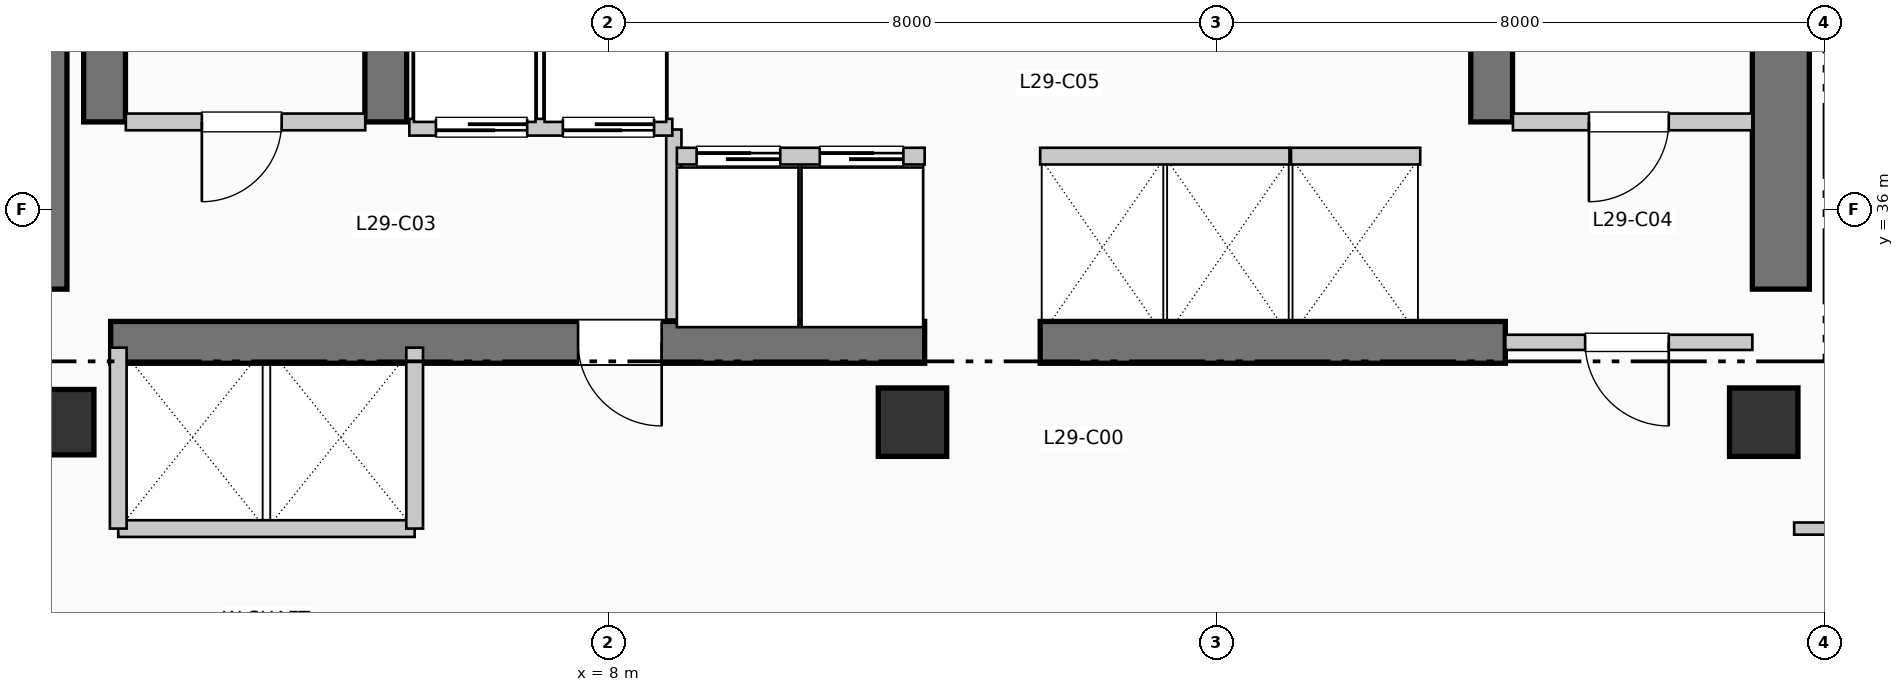
"""IFC4 building model, lengths in metres.
Left out: names, types, materials, properties, quantities, classifications, styles, units other than length and angle.
Written with IfcOpenShell. Run it as: python <this file> out.ifc"""

import sys

from ifc_helpers import new_model, si_unit, direction, frame, frame_2d, origin, origin_2d, place, context, subcontext, project, spatial, rectangle, extrude, element, fill, save


model = new_model("IFC4")
c1 = context("Model", 3, precision=1e-05, world=origin(), true_north=direction((0.0, 1.0)))
c2 = subcontext(c1, "Body", "Model", "MODEL_VIEW")
j1 = project(units=[si_unit("LENGTHUNIT", "METRE"), si_unit("PLANEANGLEUNIT", "RADIAN")], contexts=[c1])
p1 = place(None, origin())
s1 = spatial("IfcSite", under=j1, at=p1, CompositionType="ELEMENT")
p2 = place(p1, origin())
s2 = spatial("IfcBuilding", under=s1, at=p2, CompositionType="ELEMENT")
p3 = place(p2, frame((0.0, 0.0, 122.43)))
s3 = spatial("IfcBuildingStorey", under=s2, at=p3, CompositionType="ELEMENT", Elevation=122.43)
p4 = place(p3, frame((0.5, 34.95, 0.0), z_axis=(0.0, 0.0, 1.0), x_axis=(0.0, 1.0, 0.0)))
e1 = element("IfcWall", 1, at=p4, inside=s3, PredefinedType="SHEAR", context=c2, shape_type="SweptSolid", body=[
    extrude(rectangle(XDim=7.9, YDim=0.75, at=frame_2d((3.95, 0.0))), origin(), (0.0, 0.0, 1.0), 3.96),
])
p5 = place(p3, frame((23.425, 34.95, 0.0), z_axis=(0.0, 0.0, 1.0), x_axis=(0.0, 1.0, 0.0)))
e2 = element("IfcWall", 2, at=p5, inside=s3, PredefinedType="SHEAR", context=c2, shape_type="SweptSolid", body=[
    extrude(rectangle(XDim=10.64, YDim=0.75, at=frame_2d((5.32, 0.0))), origin(), (0.0, 0.0, 1.0), 3.96),
])
p6 = place(p3, frame((1.45, 34.25, 0.0), z_axis=(0.0, 0.0, 1.0), x_axis=(1.0, 0.0, 0.0)))
e3 = element("IfcWall", 3, at=p6, inside=s3, PredefinedType="SHEAR", context=c2, shape_type="SweptSolid", body=[
    extrude(rectangle(XDim=10.71, YDim=0.55, at=frame_2d((5.355, 0.0))), origin(), (0.0, 0.0, 1.0), 3.96),
])
p7 = place(p6, frame((7.25, 0.0, 0.0), z_axis=(0.0, 0.0, 1.0), x_axis=(-1.0, 0.0, 0.0)))
e4 = element("IfcOpeningElement", 4, at=p7, cuts=e3, PredefinedType="OPENING", context=c2, shape_type="SweptSolid", body=[
    extrude(rectangle(XDim=1.1, YDim=2.15, at=frame_2d((0.55, 1.075))), frame((0.0, 0.285, 0.0), z_axis=(0.0, -1.0, 0.0), x_axis=(1.0, 0.0, 0.0)), (0.0, 0.0, 1.0), 0.57),
])
p8 = place(p3, frame((13.68, 34.25, 0.0), z_axis=(0.0, 0.0, 1.0), x_axis=(1.0, 0.0, 0.0)))
e5 = element("IfcWall", 5, at=p8, inside=s3, PredefinedType="SHEAR", context=c2, shape_type="SweptSolid", body=[
    extrude(rectangle(XDim=6.12, YDim=0.55, at=frame_2d((3.06, 0.0))), origin(), (0.0, 0.0, 1.0), 3.96),
])
for number, where, z_axis, x_axis in (
    (6, (1.37, 37.15, 0.0), (0.0, 0.0, 1.0), (0.0, 1.0, 0.0)),
    (7, (5.07, 37.15, 0.0), (0.0, 0.0, 1.0), (0.0, 1.0, 0.0)),
    (8, (19.62, 37.15, 0.0), (0.0, 0.0, 1.0), (0.0, 1.0, 0.0)),
):
    element("IfcWall", number, at=place(p3, frame(where, z_axis=z_axis, x_axis=x_axis)), inside=s3, PredefinedType="SHEAR", context=c2, shape_type="SweptSolid", body=[
        extrude(rectangle(XDim=7.89, YDim=0.55, at=frame_2d((3.945, 0.0))), origin(), (0.0, 0.0, 1.0), 3.96),
    ])
p9 = place(p3, frame((0.8, 33.2, 0.0), z_axis=(0.0, 0.0, 1.0), x_axis=(1.0, 0.0, 0.0)))
e9 = element("IfcColumn", 9, at=p9, inside=s3, PredefinedType="COLUMN", context=c2, shape_type="SweptSolid", body=[
    extrude(rectangle(XDim=0.86, YDim=0.86, at=origin_2d()), origin(), (0.0, 0.0, 1.0), 3.96),
])
for number, where, z_axis, x_axis in (
    (10, (12.0, 33.2, 0.0), (0.0, 0.0, 1.0), (1.0, 0.0, 0.0)),
    (11, (23.2, 33.2, 0.0), (0.0, 0.0, 1.0), (1.0, 0.0, 0.0)),
):
    element("IfcColumn", number, at=place(p3, frame(where, z_axis=z_axis, x_axis=x_axis)), inside=s3, PredefinedType="COLUMN", context=c2, shape_type="SweptSolid", body=[
        extrude(rectangle(XDim=0.9, YDim=0.9, at=origin_2d()), origin(), (0.0, 0.0, 1.0), 3.96),
    ])
p10 = place(p3, frame((1.65, 37.15, 0.0), z_axis=(0.0, 0.0, 1.0), x_axis=(1.0, 0.0, 0.0)))
e12 = element("IfcWall", 12, at=p10, inside=s3, PredefinedType="PARTITIONING", context=c2, shape_type="SweptSolid", body=[
    extrude(rectangle(XDim=3.15, YDim=0.22, at=frame_2d((1.575, 0.0))), origin(), (0.0, 0.0, 1.0), 3.71),
])
p11 = place(p10, frame((2.05, 0.0, 0.0), z_axis=(0.0, 0.0, 1.0), x_axis=(-1.0, 0.0, 0.0)))
e13 = element("IfcOpeningElement", 13, at=p11, cuts=e12, PredefinedType="OPENING", context=c2, shape_type="SweptSolid", body=[
    extrude(rectangle(XDim=1.05, YDim=2.15, at=frame_2d((0.525, 1.075))), frame((0.0, 0.12, 0.0), z_axis=(0.0, -1.0, 0.0), x_axis=(1.0, 0.0, 0.0)), (0.0, 0.0, 1.0), 0.24),
])
p12 = place(p3, frame((8.86, 34.55, 0.0), z_axis=(0.0, 0.0, 1.0), x_axis=(0.0, 1.0, 0.0)))
e14 = element("IfcWall", 14, at=p12, inside=s3, PredefinedType="PARTITIONING", context=c2, shape_type="SweptSolid", body=[
    extrude(rectangle(XDim=2.5, YDim=0.2, at=frame_2d((1.25, 0.0))), origin(), (0.0, 0.0, 1.0), 3.71),
])
p13 = place(p3, frame((19.9, 37.15, 0.0), z_axis=(0.0, 0.0, 1.0), x_axis=(1.0, 0.0, 0.0)))
e15 = element("IfcWall", 15, at=p13, inside=s3, PredefinedType="PARTITIONING", context=c2, shape_type="SweptSolid", body=[
    extrude(rectangle(XDim=3.15, YDim=0.22, at=frame_2d((1.575, 0.0))), origin(), (0.0, 0.0, 1.0), 3.71),
])
p14 = place(p13, frame((2.05, 0.0, 0.0), z_axis=(0.0, 0.0, 1.0), x_axis=(-1.0, 0.0, 0.0)))
e16 = element("IfcOpeningElement", 16, at=p14, cuts=e15, PredefinedType="OPENING", context=c2, shape_type="SweptSolid", body=[
    extrude(rectangle(XDim=1.05, YDim=2.15, at=frame_2d((0.525, 1.075))), frame((0.0, 0.12, 0.0), z_axis=(0.0, -1.0, 0.0), x_axis=(1.0, 0.0, 0.0)), (0.0, 0.0, 1.0), 0.24),
])
p15 = place(p3, frame((19.8, 34.25, 0.0), z_axis=(0.0, 0.0, 1.0), x_axis=(1.0, 0.0, 0.0)))
e17 = element("IfcWall", 17, at=p15, inside=s3, PredefinedType="PARTITIONING", context=c2, shape_type="SweptSolid", body=[
    extrude(rectangle(XDim=3.25, YDim=0.2, at=frame_2d((1.625, 0.0))), origin(), (0.0, 0.0, 1.0), 3.71),
])
p16 = place(p15, frame((2.15, 0.0, 0.0), z_axis=(0.0, 0.0, 1.0), x_axis=(-1.0, 0.0, 0.0)))
e18 = element("IfcOpeningElement", 18, at=p16, cuts=e17, PredefinedType="OPENING", context=c2, shape_type="SweptSolid", body=[
    extrude(rectangle(XDim=1.1, YDim=2.15, at=frame_2d((0.55, 1.075))), frame((0.0, 0.11, 0.0), z_axis=(0.0, -1.0, 0.0), x_axis=(1.0, 0.0, 0.0)), (0.0, 0.0, 1.0), 0.22),
])
p17 = place(p3, frame((5.38, 37.08, 0.0), z_axis=(0.0, 0.0, 1.0), x_axis=(1.0, 0.0, 0.0)))
e19 = element("IfcWall", 19, at=p17, inside=s3, PredefinedType="PARTITIONING", context=c2, shape_type="SweptSolid", body=[
    extrude(rectangle(XDim=3.46, YDim=0.22, at=frame_2d((1.73, 0.0))), origin(), (0.0, 0.0, 1.0), 3.71),
])
p18 = place(p17, frame((1.55, 0.0, 0.0), z_axis=(0.0, 0.0, 1.0), x_axis=(-1.0, 0.0, 0.0)))
e20 = element("IfcOpeningElement", 20, at=p18, cuts=e19, PredefinedType="OPENING", context=c2, shape_type="SweptSolid", body=[
    extrude(rectangle(XDim=1.2, YDim=2.2, at=frame_2d((0.6, 1.1))), frame((0.0, 0.12, 0.0), z_axis=(0.0, -1.0, 0.0), x_axis=(1.0, 0.0, 0.0)), (0.0, 0.0, 1.0), 0.24),
])
p19 = place(p17, frame((3.22, 0.0, 0.0), z_axis=(0.0, 0.0, 1.0), x_axis=(-1.0, 0.0, 0.0)))
e21 = element("IfcOpeningElement", 21, at=p19, cuts=e19, PredefinedType="OPENING", context=c2, shape_type="SweptSolid", body=[
    extrude(rectangle(XDim=1.2, YDim=2.2, at=frame_2d((0.6, 1.1))), frame((0.0, 0.12, 0.0), z_axis=(0.0, -1.0, 0.0), x_axis=(1.0, 0.0, 0.0)), (0.0, 0.0, 1.0), 0.24),
])
p20 = place(p3, frame((1.55, 31.8, 0.0), z_axis=(0.0, 0.0, 1.0), x_axis=(1.0, 0.0, 0.0)))
e22 = element("IfcWall", 22, at=p20, inside=s3, PredefinedType="PARTITIONING", context=c2, shape_type="SweptSolid", body=[
    extrude(rectangle(XDim=3.9, YDim=0.22, at=frame_2d((1.95, 0.0))), origin(), (0.0, 0.0, 1.0), 3.71),
])
for number, where, z_axis, x_axis in (
    (23, (1.55, 31.8, 0.0), (0.0, 0.0, 1.0), (0.0, 1.0, 0.0)),
    (24, (5.45, 31.8, 0.0), (0.0, 0.0, 1.0), (0.0, 1.0, 0.0)),
):
    element("IfcWall", number, at=place(p3, frame(where, z_axis=z_axis, x_axis=x_axis)), inside=s3, PredefinedType="PARTITIONING", context=c2, shape_type="SweptSolid", body=[
        extrude(rectangle(XDim=2.38, YDim=0.22, at=frame_2d((1.19, 0.0))), origin(), (0.0, 0.0, 1.0), 3.71),
    ])
p21 = place(p3, frame((8.9, 36.7, 0.0), z_axis=(0.0, 0.0, 1.0), x_axis=(1.0, 0.0, 0.0)))
e25 = element("IfcWall", 25, at=p21, inside=s3, PredefinedType="PARTITIONING", context=c2, shape_type="SweptSolid", body=[
    extrude(rectangle(XDim=3.26, YDim=0.22, at=frame_2d((1.63, 0.0))), origin(), (0.0, 0.0, 1.0), 3.71),
])
p22 = place(p21, frame((0.26, 0.0, 0.0)))
e26 = element("IfcOpeningElement", 26, at=p22, cuts=e25, PredefinedType="OPENING", context=c2, shape_type="SweptSolid", body=[
    extrude(rectangle(XDim=1.1, YDim=2.2, at=frame_2d((0.55, 1.1))), frame((0.0, 0.12, 0.0), z_axis=(0.0, -1.0, 0.0), x_axis=(1.0, 0.0, 0.0)), (0.0, 0.0, 1.0), 0.24),
])
p23 = place(p21, frame((1.88, 0.0, 0.0)))
e27 = element("IfcOpeningElement", 27, at=p23, cuts=e25, PredefinedType="OPENING", context=c2, shape_type="SweptSolid", body=[
    extrude(rectangle(XDim=1.1, YDim=2.2, at=frame_2d((0.55, 1.1))), frame((0.0, 0.12, 0.0), z_axis=(0.0, -1.0, 0.0), x_axis=(1.0, 0.0, 0.0)), (0.0, 0.0, 1.0), 0.24),
])
p24 = place(p3, frame((13.68, 36.7, 0.0), z_axis=(0.0, 0.0, 1.0), x_axis=(1.0, 0.0, 0.0)))
e28 = element("IfcWall", 28, at=p24, inside=s3, PredefinedType="PARTITIONING", context=c2, shape_type="SweptSolid", body=[
    extrude(rectangle(XDim=3.28, YDim=0.22, at=frame_2d((1.64, 0.0))), origin(), (0.0, 0.0, 1.0), 3.71),
])
p25 = place(p3, frame((16.98, 36.7, 0.0), z_axis=(0.0, 0.0, 1.0), x_axis=(1.0, 0.0, 0.0)))
e29 = element("IfcWall", 29, at=p25, inside=s3, PredefinedType="PARTITIONING", context=c2, shape_type="SweptSolid", body=[
    extrude(rectangle(XDim=1.7, YDim=0.22, at=frame_2d((0.85, 0.0))), origin(), (0.0, 0.0, 1.0), 3.71),
])
p26 = place(p3, frame((23.6, 31.8, 0.0), z_axis=(0.0, 0.0, 1.0), x_axis=(1.0, 0.0, 0.0)))
e30 = element("IfcWall", 30, at=p26, inside=s3, PredefinedType="PARTITIONING", context=c2, shape_type="SweptSolid", body=[
    extrude(rectangle(XDim=26.41, YDim=0.16, at=frame_2d((13.205, 0.0))), origin(), (0.0, 0.0, 1.0), 3.71),
])
p27 = place(p26, frame((4.147, 0.0, 0.0)))
e31 = element("IfcOpeningElement", 31, at=p27, cuts=e30, PredefinedType="OPENING", context=c2, shape_type="SweptSolid", body=[
    extrude(rectangle(XDim=0.95, YDim=2.15, at=frame_2d((0.475, 1.075))), frame((0.0, 0.09, 0.0), z_axis=(0.0, -1.0, 0.0), x_axis=(1.0, 0.0, 0.0)), (0.0, 0.0, 1.0), 0.18),
])
p28 = place(p26, frame((13.39, 0.0, 0.0)))
e32 = element("IfcOpeningElement", 32, at=p28, cuts=e30, PredefinedType="OPENING", context=c2, shape_type="SweptSolid", body=[
    extrude(rectangle(XDim=0.95, YDim=2.15, at=frame_2d((0.475, 1.075))), frame((0.0, 0.09, 0.0), z_axis=(0.0, -1.0, 0.0), x_axis=(1.0, 0.0, 0.0)), (0.0, 0.0, 1.0), 0.18),
])
p29 = place(p26, frame((21.973, 0.0, 0.0)))
e33 = element("IfcOpeningElement", 33, at=p29, cuts=e30, PredefinedType="OPENING", context=c2, shape_type="SweptSolid", body=[
    extrude(rectangle(XDim=0.95, YDim=2.15, at=frame_2d((0.475, 1.075))), frame((0.0, 0.09, 0.0), z_axis=(0.0, -1.0, 0.0), x_axis=(1.0, 0.0, 0.0)), (0.0, 0.0, 1.0), 0.18),
])
p30 = place(p11, origin())
e34 = element("IfcDoor", 34, at=p30, inside=s3, OperationType="SINGLE_SWING_LEFT", PredefinedType="DOOR", context=c2, shape_type="SweptSolid", body=[
    extrude(rectangle(XDim=1.05, YDim=2.15, at=frame_2d((0.525, 1.075))), frame((0.0, 0.025, 0.0), z_axis=(0.0, -1.0, 0.0), x_axis=(1.0, 0.0, 0.0)), (0.0, 0.0, 1.0), 0.05),
])
fill(e13, e34)
p31 = place(p7, origin())
e35 = element("IfcDoor", 35, at=p31, inside=s3, OperationType="SINGLE_SWING_RIGHT", PredefinedType="DOOR", context=c2, shape_type="SweptSolid", body=[
    extrude(rectangle(XDim=1.1, YDim=2.15, at=frame_2d((0.55, 1.075))), frame((0.0, 0.025, 0.0), z_axis=(0.0, -1.0, 0.0), x_axis=(1.0, 0.0, 0.0)), (0.0, 0.0, 1.0), 0.05),
])
fill(e4, e35)
p32 = place(p14, origin())
e36 = element("IfcDoor", 36, at=p32, inside=s3, OperationType="SINGLE_SWING_LEFT", PredefinedType="DOOR", context=c2, shape_type="SweptSolid", body=[
    extrude(rectangle(XDim=1.05, YDim=2.15, at=frame_2d((0.525, 1.075))), frame((0.0, 0.025, 0.0), z_axis=(0.0, -1.0, 0.0), x_axis=(1.0, 0.0, 0.0)), (0.0, 0.0, 1.0), 0.05),
])
fill(e16, e36)
p33 = place(p16, origin())
e37 = element("IfcDoor", 37, at=p33, inside=s3, OperationType="SINGLE_SWING_RIGHT", PredefinedType="DOOR", context=c2, shape_type="SweptSolid", body=[
    extrude(rectangle(XDim=1.1, YDim=2.15, at=frame_2d((0.55, 1.075))), frame((0.0, 0.025, 0.0), z_axis=(0.0, -1.0, 0.0), x_axis=(1.0, 0.0, 0.0)), (0.0, 0.0, 1.0), 0.05),
])
fill(e18, e37)
p34 = place(p18, origin())
e38 = element("IfcDoor", 38, at=p34, inside=s3, OperationType="SLIDING_TO_RIGHT", PredefinedType="DOOR", context=c2, shape_type="SweptSolid", body=[
    extrude(rectangle(XDim=1.2, YDim=2.2, at=frame_2d((0.6, 1.1))), frame((0.0, 0.025, 0.0), z_axis=(0.0, -1.0, 0.0), x_axis=(1.0, 0.0, 0.0)), (0.0, 0.0, 1.0), 0.05),
])
fill(e20, e38)
p35 = place(p19, origin())
e39 = element("IfcDoor", 39, at=p35, inside=s3, OperationType="SLIDING_TO_RIGHT", PredefinedType="DOOR", context=c2, shape_type="SweptSolid", body=[
    extrude(rectangle(XDim=1.2, YDim=2.2, at=frame_2d((0.6, 1.1))), frame((0.0, 0.025, 0.0), z_axis=(0.0, -1.0, 0.0), x_axis=(1.0, 0.0, 0.0)), (0.0, 0.0, 1.0), 0.05),
])
fill(e21, e39)
p36 = place(p22, origin())
e40 = element("IfcDoor", 40, at=p36, inside=s3, OperationType="SLIDING_TO_LEFT", PredefinedType="DOOR", context=c2, shape_type="SweptSolid", body=[
    extrude(rectangle(XDim=1.1, YDim=2.2, at=frame_2d((0.55, 1.1))), frame((0.0, 0.025, 0.0), z_axis=(0.0, -1.0, 0.0), x_axis=(1.0, 0.0, 0.0)), (0.0, 0.0, 1.0), 0.05),
])
fill(e26, e40)
p37 = place(p23, origin())
e41 = element("IfcDoor", 41, at=p37, inside=s3, OperationType="SLIDING_TO_LEFT", PredefinedType="DOOR", context=c2, shape_type="SweptSolid", body=[
    extrude(rectangle(XDim=1.1, YDim=2.2, at=frame_2d((0.55, 1.1))), frame((0.0, 0.025, 0.0), z_axis=(0.0, -1.0, 0.0), x_axis=(1.0, 0.0, 0.0)), (0.0, 0.0, 1.0), 0.05),
])
fill(e27, e41)
save(model, sys.argv[1])
